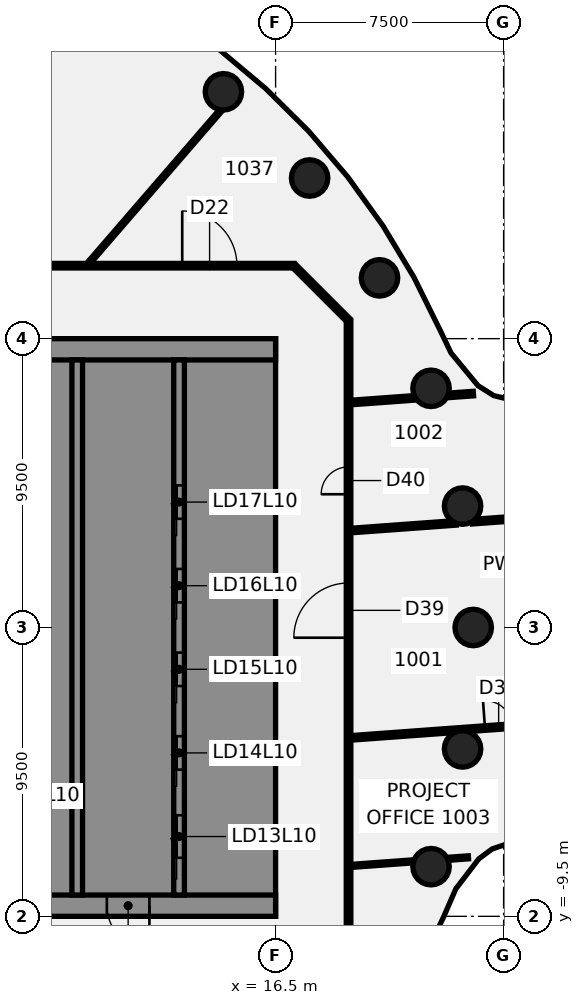
"""IFC4 building model, lengths in metres.
Left out: names, types, materials, properties, quantities, classifications, styles, units other than length and angle.
Written with IfcOpenShell. Run it as: python <this file> out.ifc"""

import sys

from ifc_helpers import new_model, si_unit, direction, frame, frame_2d, origin, origin_2d, place, context, subcontext, project, spatial, polyline, rectangle, circle, outline, extrude, element, fill, save


model = new_model("IFC4")
c1 = context("Model", 3, precision=1e-05, world=origin(), true_north=direction((0.0, 1.0)))
c2 = subcontext(c1, "Body", "Model", "MODEL_VIEW")
j1 = project(units=[si_unit("LENGTHUNIT", "METRE"), si_unit("PLANEANGLEUNIT", "RADIAN")], contexts=[c1])
p1 = place(None, origin())
s1 = spatial("IfcSite", under=j1, at=p1, CompositionType="ELEMENT")
p2 = place(p1, origin())
s2 = spatial("IfcBuilding", under=s1, at=p2, CompositionType="ELEMENT")
p3 = place(p2, frame((0.0, 0.0, 49.0)))
s3 = spatial("IfcBuildingStorey", under=s2, at=p3, CompositionType="ELEMENT", Elevation=49.0)
for number, where, z_axis, x_axis in (
    (1, (23.0, 0.0, -0.14), (0.0, 0.0, 1.0), (1.0, 0.0, 0.0)),
    (2, (22.651, 3.994, -0.14), (0.0, 0.0, 1.0), (1.0, 0.0, 0.0)),
    (3, (21.613, 7.866, -0.14), (0.0, 0.0, 1.0), (1.0, 0.0, 0.0)),
    (4, (19.919, 11.5, -0.14), (0.0, 0.0, 1.0), (1.0, 0.0, 0.0)),
    (5, (17.619, 14.784, -0.14), (0.0, 0.0, 1.0), (1.0, 0.0, 0.0)),
    (6, (14.784, 17.619, -0.14), (0.0, 0.0, 1.0), (1.0, 0.0, 0.0)),
    (7, (21.613, -7.866, -0.14), (0.0, 0.0, 1.0), (1.0, 0.0, 0.0)),
    (8, (22.651, -3.994, -0.14), (0.0, 0.0, 1.0), (1.0, 0.0, 0.0)),
):
    element("IfcColumn", number, at=place(p3, frame(where, z_axis=z_axis, x_axis=x_axis)), inside=s3, PredefinedType="COLUMN", context=c2, shape_type="SweptSolid", body=[
        extrude(circle(Radius=0.6, at=origin_2d()), origin(), (0.0, 0.0, 1.0), 3.75),
    ])
p4 = place(p3, frame((17.128, 11.872, 0.0), z_axis=(0.0, 0.0, 1.0), x_axis=(0.707106781187, -0.707106781187, 0.0)))
e9 = element("IfcWall", 9, at=p4, inside=s3, PredefinedType="PARTITIONING", context=c2, shape_type="SweptSolid", body=[
    extrude(rectangle(XDim=2.465, YDim=0.15, at=frame_2d((1.232, 0.0))), origin(), (0.0, 0.0, 1.0), 3.01),
])
p5 = place(p3, frame((-17.065, 11.9, 0.0), z_axis=(0.0, 0.0, 1.0), x_axis=(1.0, 0.0, 0.0)))
e10 = element("IfcWall", 10, at=p5, inside=s3, PredefinedType="PARTITIONING", context=c2, shape_type="SweptSolid", body=[
    extrude(rectangle(XDim=34.165, YDim=0.15, at=frame_2d((17.083, 0.0))), origin(), (0.0, 0.0, 1.0), 3.01),
])
p6 = place(p5, frame((16.944, 0.0, 0.0)))
e11 = element("IfcOpeningElement", 11, at=p6, cuts=e10, PredefinedType="OPENING", context=c2, shape_type="SweptSolid", body=[
    extrude(rectangle(XDim=1.8, YDim=2.1, at=frame_2d((0.9, 1.05))), frame((0.0, 0.085, 0.0), z_axis=(0.0, -1.0, 0.0), x_axis=(1.0, 0.0, 0.0)), (0.0, 0.0, 1.0), 0.17),
])
p7 = place(p5, frame((30.494, 0.0, 0.0)))
e12 = element("IfcOpeningElement", 12, at=p7, cuts=e10, PredefinedType="OPENING", context=c2, shape_type="SweptSolid", body=[
    extrude(rectangle(XDim=1.8, YDim=2.1, at=frame_2d((0.9, 1.05))), frame((0.0, 0.085, 0.0), z_axis=(0.0, -1.0, 0.0), x_axis=(1.0, 0.0, 0.0)), (0.0, 0.0, 1.0), 0.17),
])
p8 = place(p5, frame((5.089, 0.0, 0.0)))
e13 = element("IfcOpeningElement", 13, at=p8, cuts=e10, PredefinedType="OPENING", context=c2, shape_type="SweptSolid", body=[
    extrude(rectangle(XDim=1.8, YDim=2.1, at=frame_2d((0.9, 1.05))), frame((0.0, 0.085, 0.0), z_axis=(0.0, -1.0, 0.0), x_axis=(1.0, 0.0, 0.0)), (0.0, 0.0, 1.0), 0.17),
])
p9 = place(p3, frame((18.965, -3.631, 0.0), z_axis=(0.0, 0.0, 1.0), x_axis=(0.997335024117, 0.072957862281, 0.0)))
e14 = element("IfcWall", 14, at=p9, inside=s3, PredefinedType="PARTITIONING", context=c2, shape_type="SweptSolid", body=[
    extrude(rectangle(XDim=6.997, YDim=0.15, at=frame_2d((3.499, 0.0))), origin(), (0.0, 0.0, 1.0), 3.01),
])
p10 = place(p9, frame((4.435, 0.0, 0.0)))
e15 = element("IfcOpeningElement", 15, at=p10, cuts=e14, PredefinedType="OPENING", context=c2, shape_type="SweptSolid", body=[
    extrude(rectangle(XDim=0.9, YDim=2.1, at=frame_2d((0.45, 1.05))), frame((0.0, 0.085, 0.0), z_axis=(0.0, -1.0, 0.0), x_axis=(1.0, 0.0, 0.0)), (0.0, 0.0, 1.0), 0.17),
])
p11 = place(p3, frame((18.965, 3.188, 0.0), z_axis=(0.0, 0.0, 1.0), x_axis=(0.99734640783, 0.072802079559, 0.0)))
e16 = element("IfcWall", 16, at=p11, inside=s3, PredefinedType="PARTITIONING", context=c2, shape_type="SweptSolid", body=[
    extrude(rectangle(XDim=3.481, YDim=0.15, at=frame_2d((1.74, 0.0))), origin(), (0.0, 0.0, 1.0), 3.01),
])
p12 = place(p3, frame((22.97, 3.48, 0.0), z_axis=(0.0, 0.0, 1.0), x_axis=(0.997343660578, 0.072839705548, 0.0)))
e17 = element("IfcWall", 17, at=p12, inside=s3, PredefinedType="PARTITIONING", context=c2, shape_type="SweptSolid", body=[
    extrude(rectangle(XDim=2.484, YDim=0.15, at=frame_2d((1.242, 0.0))), origin(), (0.0, 0.0, 1.0), 3.01),
])
p13 = place(p3, frame((18.965, 7.399, 0.0), z_axis=(0.0, 0.0, 1.0), x_axis=(0.997338191972, 0.072914544736, 0.0)))
e18 = element("IfcWall", 18, at=p13, inside=s3, PredefinedType="PARTITIONING", context=c2, shape_type="SweptSolid", body=[
    extrude(rectangle(XDim=2.133, YDim=0.15, at=frame_2d((1.066, 0.0))), origin(), (0.0, 0.0, 1.0), 3.01),
])
p14 = place(p3, frame((22.16, 7.632, 0.0), z_axis=(0.0, 0.0, 1.0), x_axis=(0.997348002783, 0.072780226335, 0.0)))
e19 = element("IfcWall", 19, at=p14, inside=s3, PredefinedType="PARTITIONING", context=c2, shape_type="SweptSolid", body=[
    extrude(rectangle(XDim=0.849, YDim=0.15, at=frame_2d((0.424, 0.0))), origin(), (0.0, 0.0, 1.0), 3.01),
])
p15 = place(p3, frame((18.96, -7.843, 0.0), z_axis=(0.0, 0.0, 1.0), x_axis=(0.997346939481, 0.072794795886, 0.0)))
e20 = element("IfcWall", 20, at=p15, inside=s3, PredefinedType="PARTITIONING", context=c2, shape_type="SweptSolid", body=[
    extrude(rectangle(XDim=2.096, YDim=0.1, at=frame_2d((1.048, 0.0))), origin(), (0.0, 0.0, 1.0), 3.01),
])
p16 = place(p3, frame((22.154, -7.609, 0.0), z_axis=(0.0, 0.0, 1.0), x_axis=(0.997346256242, 0.072804156196, 0.0)))
e21 = element("IfcWall", 21, at=p16, inside=s3, PredefinedType="PARTITIONING", context=c2, shape_type="SweptSolid", body=[
    extrude(rectangle(XDim=0.691, YDim=0.1, at=frame_2d((0.345, 0.0))), origin(), (0.0, 0.0, 1.0), 3.01),
])
p17 = place(p3, frame((10.359, 11.989, 0.0), z_axis=(0.0, 0.0, 1.0), x_axis=(0.653736316153, 0.756722425293, 0.0)))
e22 = element("IfcWall", 22, at=p17, inside=s3, PredefinedType="PARTITIONING", context=c2, shape_type="SweptSolid", body=[
    extrude(rectangle(XDim=6.659, YDim=0.1, at=frame_2d((3.33, 0.0))), origin(), (0.0, 0.0, 1.0), 3.01),
])
p18 = place(p3, frame((18.9, -10.1, 0.0), z_axis=(0.0, 0.0, 1.0), x_axis=(0.0, 1.0, 0.0)))
e23 = element("IfcWall", 23, at=p18, inside=s3, PredefinedType="PARTITIONING", context=c2, shape_type="SweptSolid", body=[
    extrude(rectangle(XDim=20.2, YDim=0.15, at=frame_2d((10.1, 0.0))), origin(), (0.0, 0.0, 1.0), 3.01),
])
p19 = place(p18, frame((9.764, 0.0, 0.0)))
e24 = element("IfcOpeningElement", 24, at=p19, cuts=e23, PredefinedType="OPENING", context=c2, shape_type="SweptSolid", body=[
    extrude(rectangle(XDim=1.8, YDim=2.1, at=frame_2d((0.9, 1.05))), frame((0.0, 0.085, 0.0), z_axis=(0.0, -1.0, 0.0), x_axis=(1.0, 0.0, 0.0)), (0.0, 0.0, 1.0), 0.17),
])
p20 = place(p18, frame((14.483, 0.0, 0.0)))
e25 = element("IfcOpeningElement", 25, at=p20, cuts=e23, PredefinedType="OPENING", context=c2, shape_type="SweptSolid", body=[
    extrude(rectangle(XDim=0.9, YDim=2.1, at=frame_2d((0.45, 1.05))), frame((0.0, 0.085, 0.0), z_axis=(0.0, -1.0, 0.0), x_axis=(1.0, 0.0, 0.0)), (0.0, 0.0, 1.0), 0.17),
])
p21 = place(p3, frame((16.5, -9.15, 0.0), z_axis=(0.0, 0.0, 1.0), x_axis=(-1.0, 0.0, 0.0)))
e26 = element("IfcWall", 26, at=p21, inside=s3, PredefinedType="SHEAR", context=c2, shape_type="SweptSolid", body=[
    extrude(rectangle(XDim=13.0, YDim=0.7, at=frame_2d((6.5, 0.0))), origin(), (0.0, 0.0, 1.0), 3.61),
])
p22 = place(p21, frame((4.15, 0.0, 0.0)))
e27 = element("IfcOpeningElement", 27, at=p22, cuts=e26, PredefinedType="OPENING", context=c2, shape_type="SweptSolid", body=[
    extrude(rectangle(XDim=1.4, YDim=2.1, at=frame_2d((0.7, 1.05))), frame((0.0, 0.36, 0.0), z_axis=(0.0, -1.0, 0.0), x_axis=(1.0, 0.0, 0.0)), (0.0, 0.0, 1.0), 0.72),
])
p23 = place(p21, frame((10.125, 0.0, 0.0)))
e28 = element("IfcOpeningElement", 28, at=p23, cuts=e26, PredefinedType="OPENING", context=c2, shape_type="SweptSolid", body=[
    extrude(rectangle(XDim=1.4, YDim=2.1, at=frame_2d((0.7, 1.05))), frame((0.0, 0.36, 0.0), z_axis=(0.0, -1.0, 0.0), x_axis=(1.0, 0.0, 0.0)), (0.0, 0.0, 1.0), 0.72),
])
p24 = place(p3, origin())
e29 = element("IfcWall", 29, at=p24, inside=s3, PredefinedType="SHEAR", context=c2, shape_type="SweptSolid", body=[
    extrude(outline(polyline([(13.5, -8.8), (15.8, -8.8), (16.5, -8.8), (16.5, 8.8), (15.8, 8.8), (13.5, 8.8), (13.5, 8.125), (15.8, 8.125), (15.8, 5.625), (13.5, 5.625), (13.5, 5.375), (15.8, 5.375), (15.8, 2.875), (13.5, 2.875), (13.5, 2.625), (15.8, 2.625), (15.8, 0.125), (13.5, 0.125), (13.5, -0.125), (15.8, -0.125), (15.8, -2.625), (13.5, -2.625), (13.5, -2.875), (15.8, -2.875), (15.8, -5.375), (13.5, -5.375), (13.5, -5.625), (15.8, -5.625), (15.8, -8.125), (13.5, -8.125), (13.5, -8.8)])), origin(), (0.0, 0.0, 1.0), 3.61),
])
p25 = place(p3, frame((16.5, 9.15, 0.0), z_axis=(0.0, 0.0, 1.0), x_axis=(-1.0, 0.0, 0.0)))
e30 = element("IfcWall", 30, at=p25, inside=s3, PredefinedType="SHEAR", context=c2, shape_type="SweptSolid", body=[
    extrude(rectangle(XDim=13.0, YDim=0.7, at=frame_2d((6.5, 0.0))), origin(), (0.0, 0.0, 1.0), 3.61),
])
p26 = place(p3, origin())
e31 = element("IfcWall", 31, at=p26, inside=s3, PredefinedType="SHEAR", context=c2, shape_type="SweptSolid", body=[
    extrude(outline(polyline([(9.8, -5.375), (7.5, -5.375), (7.5, -2.875), (9.8, -2.875), (9.8, -2.625), (7.5, -2.625), (7.5, -0.125), (9.8, -0.125), (9.8, 0.125), (7.5, 0.125), (7.5, 2.625), (9.8, 2.625), (9.8, 2.875), (7.5, 2.875), (7.5, 5.375), (9.8, 5.375), (9.8, 5.625), (7.5, 5.625), (7.5, 8.125), (9.8, 8.125), (9.8, 8.8), (7.5, 8.8), (7.15, 8.8), (7.15, -5.625), (7.5, -5.625), (9.8, -5.625), (9.8, -5.375)])), origin(), (0.0, 0.0, 1.0), 3.61),
])
p27 = place(p3, origin())
e32 = element("IfcWall", 32, at=p27, inside=s3, PredefinedType="SHEAR", context=c2, shape_type="SweptSolid", body=[
    extrude(outline(polyline([(7.5, -8.125), (7.5, -8.8), (9.8, -8.8), (9.8, -8.125), (9.8, -5.625), (9.55, -5.625), (9.55, -8.125), (7.5, -8.125)])), origin(), (0.0, 0.0, 1.0), 3.61),
])
p28 = place(p3, frame((13.325, -8.8, 0.0), z_axis=(0.0, 0.0, 1.0), x_axis=(0.0, 1.0, 0.0)))
e33 = element("IfcWall", 33, at=p28, inside=s3, PredefinedType="SHEAR", context=c2, shape_type="SweptSolid", body=[
    extrude(rectangle(XDim=17.6, YDim=0.35, at=frame_2d((8.8, 0.0))), origin(), (0.0, 0.0, 1.0), 3.61),
])
p29 = place(p28, frame((1.225, 0.0, 0.0)))
e34 = element("IfcOpeningElement", 34, at=p29, cuts=e33, PredefinedType="OPENING", context=c2, shape_type="SweptSolid", body=[
    extrude(rectangle(XDim=1.4, YDim=2.1, at=frame_2d((0.7, 1.05))), frame((0.0, 0.185, 0.0), z_axis=(0.0, -1.0, 0.0), x_axis=(1.0, 0.0, 0.0)), (0.0, 0.0, 1.0), 0.37),
])
p30 = place(p28, frame((4.125, 0.0, 0.0)))
e35 = element("IfcOpeningElement", 35, at=p30, cuts=e33, PredefinedType="OPENING", context=c2, shape_type="SweptSolid", body=[
    extrude(rectangle(XDim=1.1, YDim=2.1, at=frame_2d((0.55, 1.05))), frame((0.0, 0.185, 0.0), z_axis=(0.0, -1.0, 0.0), x_axis=(1.0, 0.0, 0.0)), (0.0, 0.0, 1.0), 0.37),
])
p31 = place(p28, frame((6.875, 0.0, 0.0)))
e36 = element("IfcOpeningElement", 36, at=p31, cuts=e33, PredefinedType="OPENING", context=c2, shape_type="SweptSolid", body=[
    extrude(rectangle(XDim=1.1, YDim=2.1, at=frame_2d((0.55, 1.05))), frame((0.0, 0.185, 0.0), z_axis=(0.0, -1.0, 0.0), x_axis=(1.0, 0.0, 0.0)), (0.0, 0.0, 1.0), 0.37),
])
p32 = place(p28, frame((9.625, 0.0, 0.0)))
e37 = element("IfcOpeningElement", 37, at=p32, cuts=e33, PredefinedType="OPENING", context=c2, shape_type="SweptSolid", body=[
    extrude(rectangle(XDim=1.1, YDim=2.1, at=frame_2d((0.55, 1.05))), frame((0.0, 0.185, 0.0), z_axis=(0.0, -1.0, 0.0), x_axis=(1.0, 0.0, 0.0)), (0.0, 0.0, 1.0), 0.37),
])
p33 = place(p28, frame((12.375, 0.0, 0.0)))
e38 = element("IfcOpeningElement", 38, at=p33, cuts=e33, PredefinedType="OPENING", context=c2, shape_type="SweptSolid", body=[
    extrude(rectangle(XDim=1.1, YDim=2.1, at=frame_2d((0.55, 1.05))), frame((0.0, 0.185, 0.0), z_axis=(0.0, -1.0, 0.0), x_axis=(1.0, 0.0, 0.0)), (0.0, 0.0, 1.0), 0.37),
])
p34 = place(p3, frame((9.975, -8.8, 0.0), z_axis=(0.0, 0.0, 1.0), x_axis=(0.0, 1.0, 0.0)))
e39 = element("IfcWall", 39, at=p34, inside=s3, PredefinedType="SHEAR", context=c2, shape_type="SweptSolid", body=[
    extrude(rectangle(XDim=17.6, YDim=0.35, at=frame_2d((8.8, 0.0))), origin(), (0.0, 0.0, 1.0), 3.61),
])
p35 = place(p7, origin())
e40 = element("IfcDoor", 40, at=p35, inside=s3, OperationType="DOUBLE_DOOR_SINGLE_SWING", PredefinedType="DOOR", context=c2, shape_type="SweptSolid", body=[
    extrude(rectangle(XDim=1.8, YDim=2.1, at=frame_2d((0.9, 1.05))), frame((0.0, 0.025, 0.0), z_axis=(0.0, -1.0, 0.0), x_axis=(1.0, 0.0, 0.0)), (0.0, 0.0, 1.0), 0.05),
])
fill(e12, e40)
p36 = place(p10, frame((0.9, 0.0, 0.0), z_axis=(0.0, 0.0, 1.0), x_axis=(-1.0, 0.0, 0.0)))
e41 = element("IfcDoor", 41, at=p36, inside=s3, OperationType="SINGLE_SWING_RIGHT", PredefinedType="DOOR", context=c2, shape_type="SweptSolid", body=[
    extrude(rectangle(XDim=0.9, YDim=2.1, at=frame_2d((0.45, 1.05))), frame((0.0, 0.025, 0.0), z_axis=(0.0, -1.0, 0.0), x_axis=(1.0, 0.0, 0.0)), (0.0, 0.0, 1.0), 0.05),
])
fill(e15, e41)
p37 = place(p19, origin())
e42 = element("IfcDoor", 42, at=p37, inside=s3, OperationType="DOUBLE_DOOR_SINGLE_SWING", PredefinedType="DOOR", context=c2, shape_type="SweptSolid", body=[
    extrude(rectangle(XDim=1.8, YDim=2.1, at=frame_2d((0.9, 1.05))), frame((0.0, 0.025, 0.0), z_axis=(0.0, -1.0, 0.0), x_axis=(1.0, 0.0, 0.0)), (0.0, 0.0, 1.0), 0.05),
])
fill(e24, e42)
p38 = place(p20, frame((0.9, 0.0, 0.0), z_axis=(0.0, 0.0, 1.0), x_axis=(-1.0, 0.0, 0.0)))
e43 = element("IfcDoor", 43, at=p38, inside=s3, OperationType="SINGLE_SWING_RIGHT", PredefinedType="DOOR", context=c2, shape_type="SweptSolid", body=[
    extrude(rectangle(XDim=0.9, YDim=2.1, at=frame_2d((0.45, 1.05))), frame((0.0, 0.025, 0.0), z_axis=(0.0, -1.0, 0.0), x_axis=(1.0, 0.0, 0.0)), (0.0, 0.0, 1.0), 0.05),
])
fill(e25, e43)
p39 = place(p22, origin())
e44 = element("IfcDoor", 44, at=p39, inside=s3, OperationType="SINGLE_SWING_LEFT", PredefinedType="DOOR", context=c2, shape_type="SweptSolid", body=[
    extrude(rectangle(XDim=1.4, YDim=2.1, at=frame_2d((0.7, 1.05))), frame((0.0, 0.025, 0.0), z_axis=(0.0, -1.0, 0.0), x_axis=(1.0, 0.0, 0.0)), (0.0, 0.0, 1.0), 0.05),
])
fill(e27, e44)
p40 = place(p29, origin())
e45 = element("IfcDoor", 45, at=p40, inside=s3, OperationType="SLIDING_TO_LEFT", PredefinedType="DOOR", context=c2, shape_type="SweptSolid", body=[
    extrude(rectangle(XDim=1.4, YDim=2.1, at=frame_2d((0.7, 1.05))), frame((0.0, 0.025, 0.0), z_axis=(0.0, -1.0, 0.0), x_axis=(1.0, 0.0, 0.0)), (0.0, 0.0, 1.0), 0.05),
])
fill(e34, e45)
p41 = place(p30, origin())
e46 = element("IfcDoor", 46, at=p41, inside=s3, OperationType="SLIDING_TO_LEFT", PredefinedType="DOOR", context=c2, shape_type="SweptSolid", body=[
    extrude(rectangle(XDim=1.1, YDim=2.1, at=frame_2d((0.55, 1.05))), frame((0.0, 0.025, 0.0), z_axis=(0.0, -1.0, 0.0), x_axis=(1.0, 0.0, 0.0)), (0.0, 0.0, 1.0), 0.05),
])
fill(e35, e46)
p42 = place(p31, origin())
e47 = element("IfcDoor", 47, at=p42, inside=s3, OperationType="SLIDING_TO_LEFT", PredefinedType="DOOR", context=c2, shape_type="SweptSolid", body=[
    extrude(rectangle(XDim=1.1, YDim=2.1, at=frame_2d((0.55, 1.05))), frame((0.0, 0.025, 0.0), z_axis=(0.0, -1.0, 0.0), x_axis=(1.0, 0.0, 0.0)), (0.0, 0.0, 1.0), 0.05),
])
fill(e36, e47)
p43 = place(p32, origin())
e48 = element("IfcDoor", 48, at=p43, inside=s3, OperationType="SLIDING_TO_LEFT", PredefinedType="DOOR", context=c2, shape_type="SweptSolid", body=[
    extrude(rectangle(XDim=1.1, YDim=2.1, at=frame_2d((0.55, 1.05))), frame((0.0, 0.025, 0.0), z_axis=(0.0, -1.0, 0.0), x_axis=(1.0, 0.0, 0.0)), (0.0, 0.0, 1.0), 0.05),
])
fill(e37, e48)
p44 = place(p33, origin())
e49 = element("IfcDoor", 49, at=p44, inside=s3, OperationType="SLIDING_TO_LEFT", PredefinedType="DOOR", context=c2, shape_type="SweptSolid", body=[
    extrude(rectangle(XDim=1.1, YDim=2.1, at=frame_2d((0.55, 1.05))), frame((0.0, 0.025, 0.0), z_axis=(0.0, -1.0, 0.0), x_axis=(1.0, 0.0, 0.0)), (0.0, 0.0, 1.0), 0.05),
])
fill(e38, e49)
save(model, sys.argv[1])
